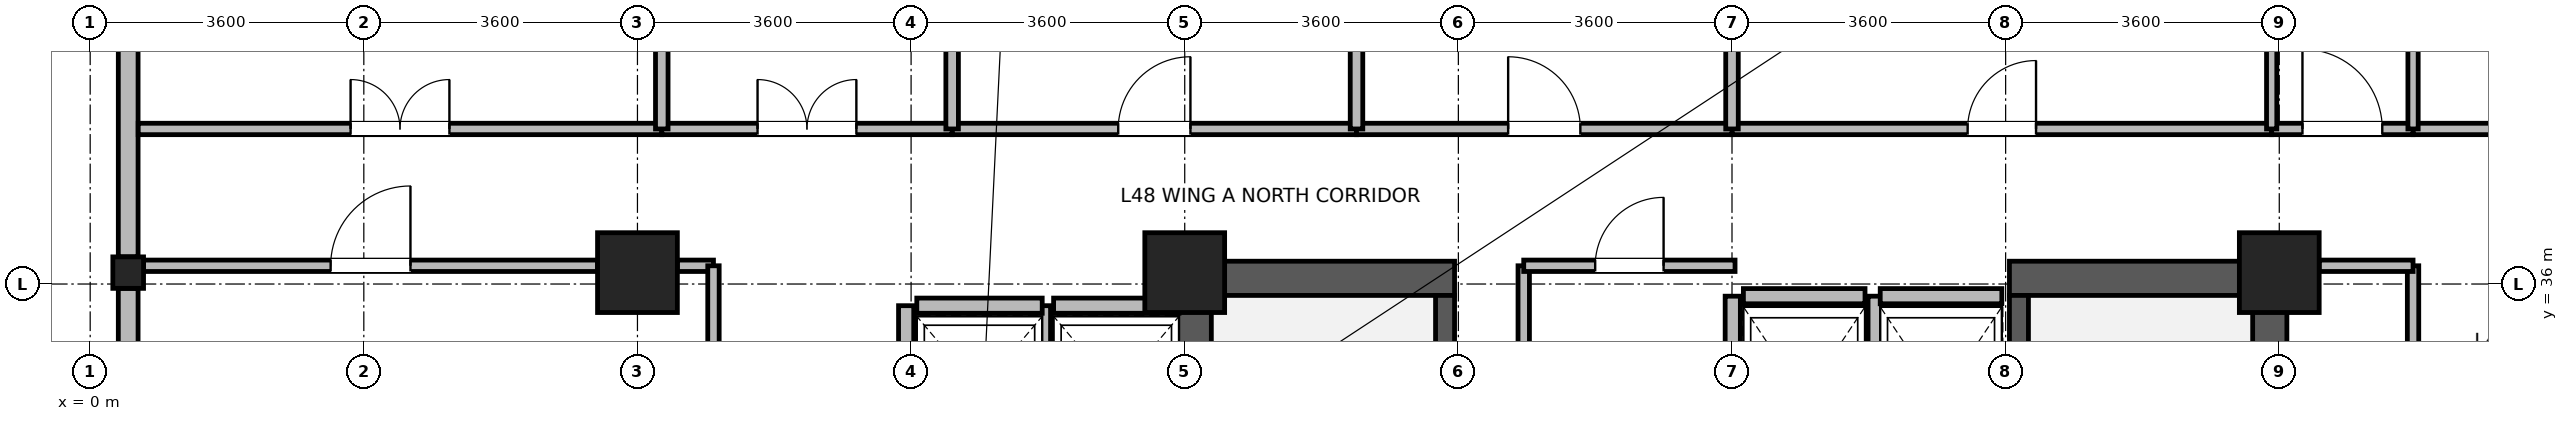
"""IFC4 building model, lengths in metres.
Left out: names, types, materials, properties, quantities, classifications, styles, units other than length and angle.
Written with IfcOpenShell. Run it as: python <this file> out.ifc"""

import sys

from ifc_helpers import new_model, si_unit, direction, frame, frame_2d, origin, origin_2d, place, context, subcontext, project, spatial, rectangle, i_section, extrude, source, transform, mapped, element, fill, save


model = new_model("IFC4")
c1 = context("Model", 3, precision=1e-05, world=origin(), true_north=direction((0.0, 1.0)))
c2 = subcontext(c1, "Body", "Model", "MODEL_VIEW")
j1 = project(units=[si_unit("LENGTHUNIT", "METRE"), si_unit("PLANEANGLEUNIT", "RADIAN")], contexts=[c1])
p1 = place(None, origin())
s1 = spatial("IfcSite", under=j1, at=p1, CompositionType="ELEMENT")
p2 = place(p1, origin())
s2 = spatial("IfcBuilding", under=s1, at=p2, CompositionType="ELEMENT")
p3 = place(p2, frame((0.0, 0.0, 188.3)))
s3 = spatial("IfcBuildingStorey", under=s2, at=p3, CompositionType="ELEMENT", Elevation=188.3)
for number, where, z_axis, x_axis in (
    (1, (14.525, 28.4, 0.0), (0.0, 0.0, 1.0), (0.0, 1.0, 0.0)),
    (2, (28.675, 28.4, 0.0), (0.0, 0.0, 1.0), (0.0, 1.0, 0.0)),
):
    element("IfcWall", number, at=place(p3, frame(where, z_axis=z_axis, x_axis=x_axis)), inside=s3, PredefinedType="SHEAR", context=c2, shape_type="SweptSolid", body=[
        extrude(rectangle(XDim=7.9, YDim=0.45, at=frame_2d((3.95, 0.0))), origin(), (0.0, 0.0, 1.0), 3.34),
    ])
for number, where, z_axis, x_axis in (
    (3, (14.75, 36.075, 0.0), (0.0, 0.0, 1.0), (1.0, 0.0, 0.0)),
    (4, (25.25, 36.075, 0.0), (0.0, 0.0, 1.0), (1.0, 0.0, 0.0)),
):
    element("IfcWall", number, at=place(p3, frame(where, z_axis=z_axis, x_axis=x_axis)), inside=s3, PredefinedType="SHEAR", context=c2, shape_type="SweptSolid", body=[
        extrude(rectangle(XDim=3.2, YDim=0.45, at=frame_2d((1.6, 0.0))), origin(), (0.0, 0.0, 1.0), 3.34),
    ])
p4 = place(p3, frame((17.825, 28.85, 0.0), z_axis=(0.0, 0.0, 1.0), x_axis=(0.0, 1.0, 0.0)))
e5 = element("IfcWall", 5, at=p4, inside=s3, PredefinedType="SHEAR", context=c2, shape_type="SweptSolid", body=[
    extrude(rectangle(XDim=7.0, YDim=0.25, at=frame_2d((3.5, 0.0))), origin(), (0.0, 0.0, 1.0), 3.34),
])
p5 = place(p4, frame((0.15, 0.0, 0.0)))
e6 = element("IfcOpeningElement", 6, at=p5, cuts=e5, PredefinedType="OPENING", context=c2, shape_type="SweptSolid", body=[
    extrude(rectangle(XDim=1.1, YDim=2.08, at=frame_2d((0.55, 1.04))), frame((0.0, 0.135, 0.0), z_axis=(0.0, -1.0, 0.0), x_axis=(1.0, 0.0, 0.0)), (0.0, 0.0, 1.0), 0.27),
])
p6 = place(p3, frame((25.375, 28.85, 0.0), z_axis=(0.0, 0.0, 1.0), x_axis=(0.0, 1.0, 0.0)))
e7 = element("IfcWall", 7, at=p6, inside=s3, PredefinedType="SHEAR", context=c2, shape_type="SweptSolid", body=[
    extrude(rectangle(XDim=7.0, YDim=0.25, at=frame_2d((3.5, 0.0))), origin(), (0.0, 0.0, 1.0), 3.34),
])
p7 = place(p6, frame((0.15, 0.0, 0.0)))
e8 = element("IfcOpeningElement", 8, at=p7, cuts=e7, PredefinedType="OPENING", context=c2, shape_type="SweptSolid", body=[
    extrude(rectangle(XDim=1.1, YDim=2.08, at=frame_2d((0.55, 1.04))), frame((0.0, 0.135, 0.0), z_axis=(0.0, -1.0, 0.0), x_axis=(1.0, 0.0, 0.0)), (0.0, 0.0, 1.0), 0.27),
])
m1 = source(origin(), c2, "Body", "SweptSolid", [
    extrude(rectangle(XDim=1.05, YDim=1.05, at=origin_2d()), origin(), (0.0, 0.0, 1.0), 3.7),
])
for number, where, z_axis, x_axis in (
    (9, (7.2, 36.15, 0.0), (0.0, 0.0, 1.0), (1.0, 0.0, 0.0)),
    (10, (14.4, 36.15, 0.0), (0.0, 0.0, 1.0), (1.0, 0.0, 0.0)),
    (11, (28.8, 36.15, 0.0), (0.0, 0.0, 1.0), (1.0, 0.0, 0.0)),
):
    element("IfcColumn", number, at=place(p3, frame(where, z_axis=z_axis, x_axis=x_axis)), inside=s3, PredefinedType="COLUMN", context=c2, shape_type="MappedRepresentation", body=[
        mapped(m1, transform((0.0, 0.0, 0.0), x_axis=(1.0, 0.0, 0.0), y_axis=(0.0, 1.0, 0.0), z_axis=(0.0, 0.0, 1.0), scale=1.0)),
    ])
m2 = source(origin(), c2, "Body", "SweptSolid", [
    extrude(i_section(OverallWidth=0.404, OverallDepth=0.414, WebThickness=0.021, FlangeThickness=0.028, FilletRadius=0.015, at=origin_2d()), origin(), (0.0, 0.0, 1.0), 3.7),
])
p8 = place(p3, frame((0.5, 36.15, 0.0), z_axis=(0.0, 0.0, 1.0), x_axis=(1.0, 0.0, 0.0)))
e12 = element("IfcColumn", 12, at=p8, inside=s3, PredefinedType="COLUMN", context=c2, shape_type="MappedRepresentation", body=[
    mapped(m2, transform((0.0, 0.0, 0.0), x_axis=(1.0, 0.0, 0.0), y_axis=(0.0, 1.0, 0.0), z_axis=(0.0, 0.0, 1.0), scale=1.0)),
])
p9 = place(p3, frame((0.5, 36.358, 0.0), z_axis=(0.0, 0.0, 1.0), x_axis=(0.0, 1.0, 0.0)))
e13 = element("IfcWall", 13, at=p9, inside=s3, PredefinedType="STANDARD", context=c2, shape_type="SweptSolid", body=[
    extrude(rectangle(XDim=6.972, YDim=0.26, at=frame_2d((3.486, 0.0))), origin(), (0.0, 0.0, 1.0), 3.32),
])
p10 = place(p9, frame((4.329, 0.0, 0.85)))
e14 = element("IfcOpeningElement", 14, at=p10, cuts=e13, PredefinedType="OPENING", context=c2, shape_type="SweptSolid", body=[
    extrude(rectangle(XDim=1.8, YDim=1.85, at=frame_2d((0.9, 0.925))), frame((0.0, 0.14, 0.0), z_axis=(0.0, -1.0, 0.0), x_axis=(1.0, 0.0, 0.0)), (0.0, 0.0, 1.0), 0.28),
])
p11 = place(p9, frame((3.011, 0.0, 0.85)))
e15 = element("IfcOpeningElement", 15, at=p11, cuts=e13, PredefinedType="OPENING", context=c2, shape_type="SweptSolid", body=[
    extrude(rectangle(XDim=0.95, YDim=1.75, at=frame_2d((0.475, 0.875))), frame((0.0, 0.14, 0.0), z_axis=(0.0, -1.0, 0.0), x_axis=(1.0, 0.0, 0.0)), (0.0, 0.0, 1.0), 0.28),
])
p12 = place(p3, frame((0.5, 28.858, 0.0), z_axis=(0.0, 0.0, 1.0), x_axis=(0.0, 1.0, 0.0)))
e16 = element("IfcWall", 16, at=p12, inside=s3, PredefinedType="STANDARD", context=c2, shape_type="SweptSolid", body=[
    extrude(rectangle(XDim=7.084, YDim=0.26, at=frame_2d((3.542, 0.0))), origin(), (0.0, 0.0, 1.0), 2.87),
])
p13 = place(p12, frame((0.871, 0.0, 0.85)))
e17 = element("IfcOpeningElement", 17, at=p13, cuts=e16, PredefinedType="OPENING", context=c2, shape_type="SweptSolid", body=[
    extrude(rectangle(XDim=1.8, YDim=1.85, at=frame_2d((0.9, 0.925))), frame((0.0, 0.14, 0.0), z_axis=(0.0, -1.0, 0.0), x_axis=(1.0, 0.0, 0.0)), (0.0, 0.0, 1.0), 0.28),
])
p14 = place(p12, frame((4.413, 0.0, 0.85)))
e18 = element("IfcOpeningElement", 18, at=p14, cuts=e16, PredefinedType="OPENING", context=c2, shape_type="SweptSolid", body=[
    extrude(rectangle(XDim=1.8, YDim=1.85, at=frame_2d((0.9, 0.925))), frame((0.0, 0.14, 0.0), z_axis=(0.0, -1.0, 0.0), x_axis=(1.0, 0.0, 0.0)), (0.0, 0.0, 1.0), 0.28),
])
p15 = place(p3, frame((12.675, 35.715, 0.0), z_axis=(0.0, 0.0, 1.0), x_axis=(1.0, 0.0, 0.0)))
e19 = element("IfcWall", 19, at=p15, inside=s3, PredefinedType="PARTITIONING", context=c2, shape_type="SweptSolid", body=[
    extrude(rectangle(XDim=1.65, YDim=0.2, at=frame_2d((0.825, 0.0))), origin(), (0.0, 0.0, 1.0), 3.32),
])
p16 = place(p3, frame((12.535, 33.485, 0.0), z_axis=(0.0, 0.0, 1.0), x_axis=(0.0, 1.0, 0.0)))
e20 = element("IfcWall", 20, at=p16, inside=s3, PredefinedType="PARTITIONING", context=c2, shape_type="SweptSolid", body=[
    extrude(rectangle(XDim=2.23, YDim=0.2, at=frame_2d((1.115, 0.0))), origin(), (0.0, 0.0, 1.0), 3.32),
])
p17 = place(p3, frame((10.875, 35.715, 0.0), z_axis=(0.0, 0.0, 1.0), x_axis=(1.0, 0.0, 0.0)))
e21 = element("IfcWall", 21, at=p17, inside=s3, PredefinedType="PARTITIONING", context=c2, shape_type="SweptSolid", body=[
    extrude(rectangle(XDim=1.65, YDim=0.2, at=frame_2d((0.825, 0.0))), origin(), (0.0, 0.0, 1.0), 3.32),
])
p18 = place(p3, frame((10.735, 33.485, 0.0), z_axis=(0.0, 0.0, 1.0), x_axis=(0.0, 1.0, 0.0)))
e22 = element("IfcWall", 22, at=p18, inside=s3, PredefinedType="PARTITIONING", context=c2, shape_type="SweptSolid", body=[
    extrude(rectangle(XDim=2.23, YDim=0.2, at=frame_2d((1.115, 0.0))), origin(), (0.0, 0.0, 1.0), 3.32),
])
p19 = place(p3, frame((21.75, 35.84, 0.0), z_axis=(0.0, 0.0, 1.0), x_axis=(1.0, 0.0, 0.0)))
e23 = element("IfcWall", 23, at=p19, inside=s3, PredefinedType="PARTITIONING", context=c2, shape_type="SweptSolid", body=[
    extrude(rectangle(XDim=1.6, YDim=0.2, at=frame_2d((0.8, 0.0))), origin(), (0.0, 0.0, 1.0), 2.32),
])
for number, where, z_axis, x_axis in (
    (24, (21.61, 33.16, 0.0), (0.0, 0.0, 1.0), (0.0, 1.0, 0.0)),
    (25, (23.49, 33.16, 0.0), (0.0, 0.0, 1.0), (0.0, 1.0, 0.0)),
):
    element("IfcWall", number, at=place(p3, frame(where, z_axis=z_axis, x_axis=x_axis)), inside=s3, PredefinedType="PARTITIONING", context=c2, shape_type="SweptSolid", body=[
        extrude(rectangle(XDim=2.68, YDim=0.2, at=frame_2d((1.34, 0.0))), origin(), (0.0, 0.0, 1.0), 3.32),
    ])
p20 = place(p3, frame((23.55, 35.84, 0.0), z_axis=(0.0, 0.0, 1.0), x_axis=(1.0, 0.0, 0.0)))
e26 = element("IfcWall", 26, at=p20, inside=s3, PredefinedType="PARTITIONING", context=c2, shape_type="SweptSolid", body=[
    extrude(rectangle(XDim=1.6, YDim=0.2, at=frame_2d((0.8, 0.0))), origin(), (0.0, 0.0, 1.0), 2.32),
])
p21 = place(p3, frame((0.702, 36.24, 0.0), z_axis=(0.0, 0.0, 1.0), x_axis=(1.0, 0.0, 0.0)))
e27 = element("IfcWall", 27, at=p21, inside=s3, PredefinedType="PARTITIONING", context=c2, shape_type="SweptSolid", body=[
    extrude(rectangle(XDim=5.973, YDim=0.15, at=frame_2d((2.987, 0.0))), origin(), (0.0, 0.0, 1.0), 2.72),
])
p22 = place(p21, frame((2.461, 0.0, 0.0)))
e28 = element("IfcOpeningElement", 28, at=p22, cuts=e27, PredefinedType="OPENING", context=c2, shape_type="SweptSolid", body=[
    extrude(rectangle(XDim=1.05, YDim=2.12, at=frame_2d((0.525, 1.06))), frame((0.0, 0.085, 0.0), z_axis=(0.0, -1.0, 0.0), x_axis=(1.0, 0.0, 0.0)), (0.0, 0.0, 1.0), 0.17),
])
p23 = place(p3, frame((7.725, 36.24, 0.0), z_axis=(0.0, 0.0, 1.0), x_axis=(1.0, 0.0, 0.0)))
e29 = element("IfcWall", 29, at=p23, inside=s3, PredefinedType="PARTITIONING", context=c2, shape_type="SweptSolid", body=[
    extrude(rectangle(XDim=0.475, YDim=0.15, at=frame_2d((0.237, 0.0))), origin(), (0.0, 0.0, 1.0), 2.72),
])
p24 = place(p3, frame((21.6, 38.04, 0.0), z_axis=(0.0, 0.0, 1.0), x_axis=(1.0, 0.0, 0.0)))
e30 = element("IfcWall", 30, at=p24, inside=s3, PredefinedType="PARTITIONING", context=c2, shape_type="SweptSolid", body=[
    extrude(rectangle(XDim=7.1, YDim=0.15, at=frame_2d((3.55, 0.0))), origin(), (0.0, 0.0, 1.0), 3.32),
])
p25 = place(p24, frame((3.1, 0.0, 0.0)))
e31 = element("IfcOpeningElement", 31, at=p25, cuts=e30, PredefinedType="OPENING", context=c2, shape_type="SweptSolid", body=[
    extrude(rectangle(XDim=0.9, YDim=2.08, at=frame_2d((0.45, 1.04))), frame((0.0, 0.085, 0.0), z_axis=(0.0, -1.0, 0.0), x_axis=(1.0, 0.0, 0.0)), (0.0, 0.0, 1.0), 0.17),
])
p26 = place(p3, frame((0.632, 38.04, 0.0), z_axis=(0.0, 0.0, 1.0), x_axis=(1.0, 0.0, 0.0)))
e32 = element("IfcWall", 32, at=p26, inside=s3, PredefinedType="PARTITIONING", context=c2, shape_type="SweptSolid", body=[
    extrude(rectangle(XDim=6.888, YDim=0.15, at=frame_2d((3.444, 0.0))), origin(), (0.0, 0.0, 1.0), 3.32),
])
p27 = place(p26, frame((2.794, 0.0, 0.0)))
e33 = element("IfcOpeningElement", 33, at=p27, cuts=e32, PredefinedType="OPENING", context=c2, shape_type="SweptSolid", body=[
    extrude(rectangle(XDim=1.3, YDim=2.12, at=frame_2d((0.65, 1.06))), frame((0.0, 0.085, 0.0), z_axis=(0.0, -1.0, 0.0), x_axis=(1.0, 0.0, 0.0)), (0.0, 0.0, 1.0), 0.17),
])
p28 = place(p3, frame((11.34, 38.04, 0.0), z_axis=(0.0, 0.0, 1.0), x_axis=(1.0, 0.0, 0.0)))
e34 = element("IfcWall", 34, at=p28, inside=s3, PredefinedType="PARTITIONING", context=c2, shape_type="SweptSolid", body=[
    extrude(rectangle(XDim=5.32, YDim=0.15, at=frame_2d((2.66, 0.0))), origin(), (0.0, 0.0, 1.0), 3.32),
])
p29 = place(p28, frame((2.185, 0.0, 0.0)))
e35 = element("IfcOpeningElement", 35, at=p29, cuts=e34, PredefinedType="OPENING", context=c2, shape_type="SweptSolid", body=[
    extrude(rectangle(XDim=0.95, YDim=2.1, at=frame_2d((0.475, 1.05))), frame((0.0, 0.085, 0.0), z_axis=(0.0, -1.0, 0.0), x_axis=(1.0, 0.0, 0.0)), (0.0, 0.0, 1.0), 0.17),
])
p30 = place(p3, frame((16.66, 38.04, 0.0), z_axis=(0.0, 0.0, 1.0), x_axis=(1.0, 0.0, 0.0)))
e36 = element("IfcWall", 36, at=p30, inside=s3, PredefinedType="PARTITIONING", context=c2, shape_type="SweptSolid", body=[
    extrude(rectangle(XDim=4.94, YDim=0.15, at=frame_2d((2.47, 0.0))), origin(), (0.0, 0.0, 1.0), 3.32),
])
p31 = place(p30, frame((1.995, 0.0, 0.0)))
e37 = element("IfcOpeningElement", 37, at=p31, cuts=e36, PredefinedType="OPENING", context=c2, shape_type="SweptSolid", body=[
    extrude(rectangle(XDim=0.95, YDim=2.1, at=frame_2d((0.475, 1.05))), frame((0.0, 0.085, 0.0), z_axis=(0.0, -1.0, 0.0), x_axis=(1.0, 0.0, 0.0)), (0.0, 0.0, 1.0), 0.17),
])
p32 = place(p3, frame((30.56, 38.04, 0.0), z_axis=(0.0, 0.0, 1.0), x_axis=(1.0, 0.0, 0.0)))
e38 = element("IfcWall", 38, at=p32, inside=s3, PredefinedType="PARTITIONING", context=c2, shape_type="SweptSolid", body=[
    extrude(rectangle(XDim=4.8, YDim=0.15, at=frame_2d((2.4, 0.0))), origin(), (0.0, 0.0, 1.0), 3.32),
])
p33 = place(p32, frame((1.75, 0.0, 0.0)))
e39 = element("IfcOpeningElement", 39, at=p33, cuts=e38, PredefinedType="OPENING", context=c2, shape_type="SweptSolid", body=[
    extrude(rectangle(XDim=1.3, YDim=2.12, at=frame_2d((0.65, 1.06))), frame((0.0, 0.085, 0.0), z_axis=(0.0, -1.0, 0.0), x_axis=(1.0, 0.0, 0.0)), (0.0, 0.0, 1.0), 0.17),
])
p34 = place(p3, frame((30.56, 31.64, 0.0), z_axis=(0.0, 0.0, 1.0), x_axis=(0.0, 1.0, 0.0)))
e40 = element("IfcWall", 40, at=p34, inside=s3, PredefinedType="PARTITIONING", context=c2, shape_type="SweptSolid", body=[
    extrude(rectangle(XDim=4.6, YDim=0.15, at=frame_2d((2.3, 0.0))), origin(), (0.0, 0.0, 1.0), 3.32),
])
p35 = place(p34, frame((1.65, 0.0, 0.0)))
e41 = element("IfcOpeningElement", 41, at=p35, cuts=e40, PredefinedType="OPENING", context=c2, shape_type="SweptSolid", body=[
    extrude(rectangle(XDim=1.3, YDim=2.12, at=frame_2d((0.65, 1.06))), frame((0.0, 0.085, 0.0), z_axis=(0.0, -1.0, 0.0), x_axis=(1.0, 0.0, 0.0)), (0.0, 0.0, 1.0), 0.17),
])
p36 = place(p3, frame((8.2, 32.4, 0.0), z_axis=(0.0, 0.0, 1.0), x_axis=(0.0, 1.0, 0.0)))
e42 = element("IfcWall", 42, at=p36, inside=s3, PredefinedType="PARTITIONING", context=c2, shape_type="SweptSolid", body=[
    extrude(rectangle(XDim=3.84, YDim=0.15, at=frame_2d((1.92, 0.0))), origin(), (0.0, 0.0, 1.0), 3.32),
])
p37 = place(p3, frame((7.52, 38.04, 0.0), z_axis=(0.0, 0.0, 1.0), x_axis=(1.0, 0.0, 0.0)))
e43 = element("IfcWall", 43, at=p37, inside=s3, PredefinedType="PARTITIONING", context=c2, shape_type="SweptSolid", body=[
    extrude(rectangle(XDim=3.82, YDim=0.15, at=frame_2d((1.91, 0.0))), origin(), (0.0, 0.0, 1.0), 3.32),
])
p38 = place(p37, frame((1.26, 0.0, 0.0)))
e44 = element("IfcOpeningElement", 44, at=p38, cuts=e43, PredefinedType="OPENING", context=c2, shape_type="SweptSolid", body=[
    extrude(rectangle(XDim=1.3, YDim=2.12, at=frame_2d((0.65, 1.06))), frame((0.0, 0.085, 0.0), z_axis=(0.0, -1.0, 0.0), x_axis=(1.0, 0.0, 0.0)), (0.0, 0.0, 1.0), 0.17),
])
p39 = place(p3, frame((18.86, 33.36, 0.0), z_axis=(0.0, 0.0, 1.0), x_axis=(0.0, 1.0, 0.0)))
e45 = element("IfcWall", 45, at=p39, inside=s3, PredefinedType="PARTITIONING", context=c2, shape_type="SweptSolid", body=[
    extrude(rectangle(XDim=2.88, YDim=0.15, at=frame_2d((1.44, 0.0))), origin(), (0.0, 0.0, 1.0), 3.32),
])
p40 = place(p3, frame((18.86, 36.24, 0.0), z_axis=(0.0, 0.0, 1.0), x_axis=(1.0, 0.0, 0.0)))
e46 = element("IfcWall", 46, at=p40, inside=s3, PredefinedType="PARTITIONING", context=c2, shape_type="SweptSolid", body=[
    extrude(rectangle(XDim=2.78, YDim=0.15, at=frame_2d((1.39, 0.0))), origin(), (0.0, 0.0, 1.0), 2.32),
])
p41 = place(p40, frame((0.94, 0.0, 0.0)))
e47 = element("IfcOpeningElement", 47, at=p41, cuts=e46, PredefinedType="OPENING", context=c2, shape_type="SweptSolid", body=[
    extrude(rectangle(XDim=0.9, YDim=2.08, at=frame_2d((0.45, 1.04))), frame((0.0, 0.085, 0.0), z_axis=(0.0, -1.0, 0.0), x_axis=(1.0, 0.0, 0.0)), (0.0, 0.0, 1.0), 0.17),
])
p42 = place(p3, frame((28.7, 38.04, 0.0), z_axis=(0.0, 0.0, 1.0), x_axis=(1.0, 0.0, 0.0)))
e48 = element("IfcWall", 48, at=p42, inside=s3, PredefinedType="PARTITIONING", context=c2, shape_type="SweptSolid", body=[
    extrude(rectangle(XDim=1.86, YDim=0.15, at=frame_2d((0.93, 0.0))), origin(), (0.0, 0.0, 1.0), 3.32),
])
p43 = place(p42, frame((0.405, 0.0, 0.0)))
e49 = element("IfcOpeningElement", 49, at=p43, cuts=e48, PredefinedType="OPENING", context=c2, shape_type="SweptSolid", body=[
    extrude(rectangle(XDim=1.05, YDim=2.12, at=frame_2d((0.525, 1.06))), frame((0.0, 0.085, 0.0), z_axis=(0.0, -1.0, 0.0), x_axis=(1.0, 0.0, 0.0)), (0.0, 0.0, 1.0), 0.17),
])
p44 = place(p3, frame((29.325, 36.24, 0.0), z_axis=(0.0, 0.0, 1.0), x_axis=(1.0, 0.0, 0.0)))
e50 = element("IfcWall", 50, at=p44, inside=s3, PredefinedType="PARTITIONING", context=c2, shape_type="SweptSolid", body=[
    extrude(rectangle(XDim=1.235, YDim=0.15, at=frame_2d((0.618, 0.0))), origin(), (0.0, 0.0, 1.0), 2.72),
])
for number, where, z_axis, x_axis in (
    (51, (7.52, 38.04, 0.0), (0.0, 0.0, 1.0), (0.0, 1.0, 0.0)),
    (52, (16.66, 38.04, 0.0), (0.0, 0.0, 1.0), (0.0, 1.0, 0.0)),
):
    element("IfcWall", number, at=place(p3, frame(where, z_axis=z_axis, x_axis=x_axis)), inside=s3, PredefinedType="PARTITIONING", context=c2, shape_type="SweptSolid", body=[
        extrude(rectangle(XDim=5.028, YDim=0.165, at=frame_2d((2.514, 0.0))), origin(), (0.0, 0.0, 1.0), 3.32),
    ])
p45 = place(p3, frame((21.6, 38.04, 0.0), z_axis=(0.0, 0.0, 1.0), x_axis=(0.0, 1.0, 0.0)))
e53 = element("IfcWall", 53, at=p45, inside=s3, PredefinedType="PARTITIONING", context=c2, shape_type="SweptSolid", body=[
    extrude(rectangle(XDim=5.028, YDim=0.165, at=frame_2d((2.514, 0.0))), origin(), (0.0, 0.0, 1.0), 2.87),
])
p46 = place(p3, frame((28.7, 38.04, 0.0), z_axis=(0.0, 0.0, 1.0), x_axis=(0.0, 1.0, 0.0)))
e54 = element("IfcWall", 54, at=p46, inside=s3, PredefinedType="PARTITIONING", context=c2, shape_type="SweptSolid", body=[
    extrude(rectangle(XDim=5.028, YDim=0.135, at=frame_2d((2.514, 0.0))), origin(), (0.0, 0.0, 1.0), 2.87),
])
p47 = place(p3, frame((30.56, 38.04, 0.0), z_axis=(0.0, 0.0, 1.0), x_axis=(0.0, 1.0, 0.0)))
e55 = element("IfcWall", 55, at=p47, inside=s3, PredefinedType="PARTITIONING", context=c2, shape_type="SweptSolid", body=[
    extrude(rectangle(XDim=5.028, YDim=0.135, at=frame_2d((2.514, 0.0))), origin(), (0.0, 0.0, 1.0), 3.32),
])
p48 = place(p3, frame((11.34, 38.04, 0.0), z_axis=(0.0, 0.0, 1.0), x_axis=(0.0, 1.0, 0.0)))
e56 = element("IfcWall", 56, at=p48, inside=s3, PredefinedType="PARTITIONING", context=c2, shape_type="SweptSolid", body=[
    extrude(rectangle(XDim=3.26, YDim=0.165, at=frame_2d((1.63, 0.0))), origin(), (0.0, 0.0, 1.0), 3.32),
])
p49 = place(p22, origin())
e57 = element("IfcDoor", 57, at=p49, inside=s3, OperationType="SINGLE_SWING_RIGHT", PredefinedType="DOOR", context=c2, shape_type="SweptSolid", body=[
    extrude(rectangle(XDim=1.05, YDim=2.12, at=frame_2d((0.525, 1.06))), frame((0.0, 0.025, 0.0), z_axis=(0.0, -1.0, 0.0), x_axis=(1.0, 0.0, 0.0)), (0.0, 0.0, 1.0), 0.05),
])
fill(e28, e57)
p50 = place(p25, origin())
e58 = element("IfcDoor", 58, at=p50, inside=s3, OperationType="SINGLE_SWING_RIGHT", PredefinedType="DOOR", context=c2, shape_type="SweptSolid", body=[
    extrude(rectangle(XDim=0.9, YDim=2.08, at=frame_2d((0.45, 1.04))), frame((0.0, 0.025, 0.0), z_axis=(0.0, -1.0, 0.0), x_axis=(1.0, 0.0, 0.0)), (0.0, 0.0, 1.0), 0.05),
])
fill(e31, e58)
p51 = place(p27, origin())
e59 = element("IfcDoor", 59, at=p51, inside=s3, OperationType="DOUBLE_DOOR_SINGLE_SWING", PredefinedType="DOOR", context=c2, shape_type="SweptSolid", body=[
    extrude(rectangle(XDim=1.3, YDim=2.12, at=frame_2d((0.65, 1.06))), frame((0.0, 0.025, 0.0), z_axis=(0.0, -1.0, 0.0), x_axis=(1.0, 0.0, 0.0)), (0.0, 0.0, 1.0), 0.05),
])
fill(e33, e59)
p52 = place(p29, origin())
e60 = element("IfcDoor", 60, at=p52, inside=s3, OperationType="SINGLE_SWING_RIGHT", PredefinedType="DOOR", context=c2, shape_type="SweptSolid", body=[
    extrude(rectangle(XDim=0.95, YDim=2.1, at=frame_2d((0.475, 1.05))), frame((0.0, 0.025, 0.0), z_axis=(0.0, -1.0, 0.0), x_axis=(1.0, 0.0, 0.0)), (0.0, 0.0, 1.0), 0.05),
])
fill(e35, e60)
p53 = place(p31, origin())
e61 = element("IfcDoor", 61, at=p53, inside=s3, OperationType="SINGLE_SWING_LEFT", PredefinedType="DOOR", context=c2, shape_type="SweptSolid", body=[
    extrude(rectangle(XDim=0.95, YDim=2.1, at=frame_2d((0.475, 1.05))), frame((0.0, 0.025, 0.0), z_axis=(0.0, -1.0, 0.0), x_axis=(1.0, 0.0, 0.0)), (0.0, 0.0, 1.0), 0.05),
])
fill(e37, e61)
p54 = place(p38, origin())
e62 = element("IfcDoor", 62, at=p54, inside=s3, OperationType="DOUBLE_DOOR_SINGLE_SWING", PredefinedType="DOOR", context=c2, shape_type="SweptSolid", body=[
    extrude(rectangle(XDim=1.3, YDim=2.12, at=frame_2d((0.65, 1.06))), frame((0.0, 0.025, 0.0), z_axis=(0.0, -1.0, 0.0), x_axis=(1.0, 0.0, 0.0)), (0.0, 0.0, 1.0), 0.05),
])
fill(e44, e62)
p55 = place(p41, origin())
e63 = element("IfcDoor", 63, at=p55, inside=s3, OperationType="SINGLE_SWING_RIGHT", PredefinedType="DOOR", context=c2, shape_type="SweptSolid", body=[
    extrude(rectangle(XDim=0.9, YDim=2.08, at=frame_2d((0.45, 1.04))), frame((0.0, 0.025, 0.0), z_axis=(0.0, -1.0, 0.0), x_axis=(1.0, 0.0, 0.0)), (0.0, 0.0, 1.0), 0.05),
])
fill(e47, e63)
p56 = place(p43, origin())
e64 = element("IfcDoor", 64, at=p56, inside=s3, OperationType="SINGLE_SWING_LEFT", PredefinedType="DOOR", context=c2, shape_type="SweptSolid", body=[
    extrude(rectangle(XDim=1.05, YDim=2.12, at=frame_2d((0.525, 1.06))), frame((0.0, 0.025, 0.0), z_axis=(0.0, -1.0, 0.0), x_axis=(1.0, 0.0, 0.0)), (0.0, 0.0, 1.0), 0.05),
])
fill(e49, e64)
save(model, sys.argv[1])
